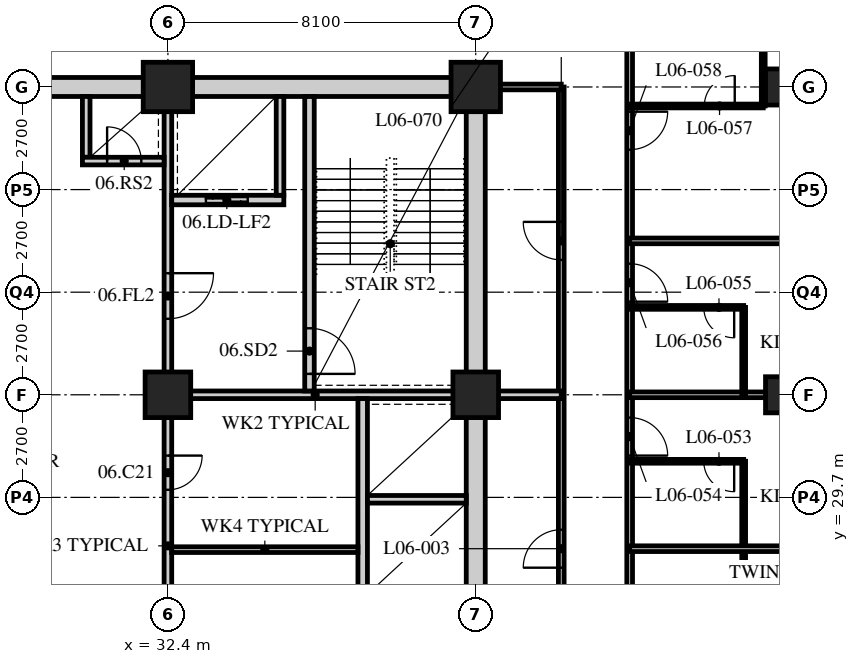
"""IFC4 building model, lengths in metres.
Left out: names, types, materials, properties, quantities, classifications, styles, units other than length and angle.
Written with IfcOpenShell. Run it as: python <this file> out.ifc"""

import sys

from ifc_helpers import new_model, si_unit, direction, frame, frame_2d, origin, origin_2d, place, context, subcontext, project, spatial, rectangle, hollow_rectangle, extrude, element, fill, save


model = new_model("IFC4")
c1 = context("Model", 3, precision=1e-05, world=origin(), true_north=direction((0.0, 1.0)))
c2 = subcontext(c1, "Body", "Model", "MODEL_VIEW")
j1 = project(units=[si_unit("LENGTHUNIT", "METRE"), si_unit("PLANEANGLEUNIT", "RADIAN")], contexts=[c1])
p1 = place(None, origin())
s1 = spatial("IfcSite", under=j1, at=p1, CompositionType="ELEMENT")
p2 = place(p1, origin())
s2 = spatial("IfcBuilding", under=s1, at=p2, CompositionType="ELEMENT")
p3 = place(p2, frame((0.0, 0.0, 33.0)))
s3 = spatial("IfcBuildingStorey", under=s2, at=p3, CompositionType="ELEMENT", Elevation=33.0)
p4 = place(p3, frame((32.4, 32.4, 0.0), z_axis=(0.0, 0.0, 1.0), x_axis=(1.0, 0.0, 0.0)))
e1 = element("IfcColumn", 1, at=p4, inside=s3, PredefinedType="COLUMN", context=c2, shape_type="SweptSolid", body=[
    extrude(hollow_rectangle(XDim=1.2, YDim=1.2, WallThickness=0.12, at=origin_2d()), origin(), (0.0, 0.0, 1.0), 3.4),
])
p5 = place(p3, frame((32.4, 40.5, 0.0), z_axis=(0.0, 0.0, 1.0), x_axis=(1.0, 0.0, 0.0)))
e2 = element("IfcColumn", 2, at=p5, inside=s3, PredefinedType="COLUMN", context=c2, shape_type="SweptSolid", body=[
    extrude(hollow_rectangle(XDim=1.3, YDim=1.3, WallThickness=0.13, at=origin_2d()), origin(), (0.0, 0.0, 1.0), 3.4),
])
p6 = place(p3, frame((40.5, 32.4, 0.0), z_axis=(0.0, 0.0, 1.0), x_axis=(1.0, 0.0, 0.0)))
e3 = element("IfcColumn", 3, at=p6, inside=s3, PredefinedType="COLUMN", context=c2, shape_type="SweptSolid", body=[
    extrude(hollow_rectangle(XDim=1.2, YDim=1.2, WallThickness=0.12, at=origin_2d()), origin(), (0.0, 0.0, 1.0), 3.4),
])
p7 = place(p3, frame((40.5, 40.5, 0.0), z_axis=(0.0, 0.0, 1.0), x_axis=(1.0, 0.0, 0.0)))
e4 = element("IfcColumn", 4, at=p7, inside=s3, PredefinedType="COLUMN", context=c2, shape_type="SweptSolid", body=[
    extrude(hollow_rectangle(XDim=1.3, YDim=1.3, WallThickness=0.13, at=origin_2d()), origin(), (0.0, 0.0, 1.0), 3.4),
])
for number, where, z_axis, x_axis in (
    (5, (48.6, 32.4, 0.0), (0.0, 0.0, 1.0), (1.0, 0.0, 0.0)),
    (6, (48.6, 40.5, 0.0), (0.0, 0.0, 1.0), (1.0, 0.0, 0.0)),
):
    element("IfcColumn", number, at=place(p3, frame(where, z_axis=z_axis, x_axis=x_axis)), inside=s3, PredefinedType="COLUMN", context=c2, shape_type="SweptSolid", body=[
        extrude(hollow_rectangle(XDim=0.95, YDim=0.95, WallThickness=0.095, at=origin_2d()), origin(), (0.0, 0.0, 1.0), 3.4),
    ])
p8 = place(p3, frame((44.55, 16.2, 0.0), z_axis=(0.0, 0.0, 1.0), x_axis=(0.0, 1.0, 0.0)))
e7 = element("IfcWall", 7, at=p8, inside=s3, PredefinedType="PARTITIONING", context=c2, shape_type="SweptSolid", body=[
    extrude(rectangle(XDim=26.1, YDim=0.15, at=frame_2d((13.05, 0.0))), origin(), (0.0, 0.0, 1.0), 3.19),
])
p9 = place(p8, frame((2.75, 0.0, 0.0)))
e8 = element("IfcOpeningElement", 8, at=p9, cuts=e7, PredefinedType="OPENING", context=c2, shape_type="SweptSolid", body=[
    extrude(rectangle(XDim=1.0, YDim=2.1, at=frame_2d((0.5, 1.05))), frame((0.0, 0.085, 0.0), z_axis=(0.0, -1.0, 0.0), x_axis=(1.0, 0.0, 0.0)), (0.0, 0.0, 1.0), 0.17),
])
p10 = place(p8, frame((4.35, 0.0, 0.0)))
e9 = element("IfcOpeningElement", 9, at=p10, cuts=e7, PredefinedType="OPENING", context=c2, shape_type="SweptSolid", body=[
    extrude(rectangle(XDim=1.0, YDim=2.1, at=frame_2d((0.5, 1.05))), frame((0.0, 0.085, 0.0), z_axis=(0.0, -1.0, 0.0), x_axis=(1.0, 0.0, 0.0)), (0.0, 0.0, 1.0), 0.17),
])
p11 = place(p8, frame((8.4, 0.0, 0.0)))
e10 = element("IfcOpeningElement", 10, at=p11, cuts=e7, PredefinedType="OPENING", context=c2, shape_type="SweptSolid", body=[
    extrude(rectangle(XDim=1.0, YDim=2.1, at=frame_2d((0.5, 1.05))), frame((0.0, 0.085, 0.0), z_axis=(0.0, -1.0, 0.0), x_axis=(1.0, 0.0, 0.0)), (0.0, 0.0, 1.0), 0.17),
])
p12 = place(p8, frame((14.6, 0.0, 0.0)))
e11 = element("IfcOpeningElement", 11, at=p12, cuts=e7, PredefinedType="OPENING", context=c2, shape_type="SweptSolid", body=[
    extrude(rectangle(XDim=1.0, YDim=2.1, at=frame_2d((0.5, 1.05))), frame((0.0, 0.085, 0.0), z_axis=(0.0, -1.0, 0.0), x_axis=(1.0, 0.0, 0.0)), (0.0, 0.0, 1.0), 0.17),
])
p13 = place(p8, frame((18.65, 0.0, 0.0)))
e12 = element("IfcOpeningElement", 12, at=p13, cuts=e7, PredefinedType="OPENING", context=c2, shape_type="SweptSolid", body=[
    extrude(rectangle(XDim=1.0, YDim=2.1, at=frame_2d((0.5, 1.05))), frame((0.0, 0.085, 0.0), z_axis=(0.0, -1.0, 0.0), x_axis=(1.0, 0.0, 0.0)), (0.0, 0.0, 1.0), 0.17),
])
p14 = place(p8, frame((22.65, 0.0, 0.0)))
e13 = element("IfcOpeningElement", 13, at=p14, cuts=e7, PredefinedType="OPENING", context=c2, shape_type="SweptSolid", body=[
    extrude(rectangle(XDim=1.0, YDim=2.1, at=frame_2d((0.5, 1.05))), frame((0.0, 0.085, 0.0), z_axis=(0.0, -1.0, 0.0), x_axis=(1.0, 0.0, 0.0)), (0.0, 0.0, 1.0), 0.17),
])
p15 = place(p3, frame((42.75, 18.0, 0.0), z_axis=(0.0, 0.0, 1.0), x_axis=(0.0, 1.0, 0.0)))
e14 = element("IfcWall", 14, at=p15, inside=s3, PredefinedType="PARTITIONING", context=c2, shape_type="SweptSolid", body=[
    extrude(rectangle(XDim=22.5, YDim=0.15, at=frame_2d((11.25, 0.0))), origin(), (0.0, 0.0, 1.0), 3.19),
])
p16 = place(p15, frame((9.85, 0.0, 0.0)))
e15 = element("IfcOpeningElement", 15, at=p16, cuts=e14, PredefinedType="OPENING", context=c2, shape_type="SweptSolid", body=[
    extrude(rectangle(XDim=1.0, YDim=2.1, at=frame_2d((0.5, 1.05))), frame((0.0, 0.085, 0.0), z_axis=(0.0, -1.0, 0.0), x_axis=(1.0, 0.0, 0.0)), (0.0, 0.0, 1.0), 0.17),
])
p17 = place(p15, frame((17.95, 0.0, 0.0)))
e16 = element("IfcOpeningElement", 16, at=p17, cuts=e14, PredefinedType="OPENING", context=c2, shape_type="SweptSolid", body=[
    extrude(rectangle(XDim=1.0, YDim=2.1, at=frame_2d((0.5, 1.05))), frame((0.0, 0.085, 0.0), z_axis=(0.0, -1.0, 0.0), x_axis=(1.0, 0.0, 0.0)), (0.0, 0.0, 1.0), 0.17),
])
p18 = place(p3, frame((42.75, 40.5, 0.0), z_axis=(0.0, 0.0, 1.0), x_axis=(-1.0, 0.0, 0.0)))
e17 = element("IfcWall", 17, at=p18, inside=s3, PredefinedType="PARTITIONING", context=c2, shape_type="SweptSolid", body=[
    extrude(rectangle(XDim=2.05, YDim=0.15, at=frame_2d((1.025, 0.0))), origin(), (0.0, 0.0, 1.0), 2.578),
])
p19 = place(p3, frame((40.5, 32.4, 0.0), z_axis=(0.0, 0.0, 1.0), x_axis=(1.0, 0.0, 0.0)))
e18 = element("IfcWall", 18, at=p19, inside=s3, PredefinedType="SOLIDWALL", context=c2, shape_type="SweptSolid", body=[
    extrude(rectangle(XDim=2.25, YDim=0.2, at=frame_2d((1.125, 0.0))), origin(), (0.0, 0.0, 1.0), 2.578),
])
p20 = place(p3, frame((47.55, 25.75, 0.0), z_axis=(0.0, 0.0, 1.0), x_axis=(0.0, 1.0, 0.0)))
e19 = element("IfcWall", 19, at=p20, inside=s3, PredefinedType="PARTITIONING", context=c2, shape_type="SweptSolid", body=[
    extrude(rectangle(XDim=4.9, YDim=0.1, at=frame_2d((2.45, 0.0))), origin(), (0.0, 0.0, 1.0), 3.19),
])
p21 = place(p3, frame((44.55, 28.35, 0.0), z_axis=(0.0, 0.0, 1.0), x_axis=(1.0, 0.0, 0.0)))
e20 = element("IfcWall", 20, at=p21, inside=s3, PredefinedType="PARTITIONING", context=c2, shape_type="SweptSolid", body=[
    extrude(rectangle(XDim=11.85, YDim=0.15, at=frame_2d((5.925, 0.0))), origin(), (0.0, 0.0, 1.0), 3.19),
])
p22 = place(p3, frame((44.55, 30.65, 0.0), z_axis=(0.0, 0.0, 1.0), x_axis=(1.0, 0.0, 0.0)))
e21 = element("IfcWall", 21, at=p22, inside=s3, PredefinedType="PARTITIONING", context=c2, shape_type="SweptSolid", body=[
    extrude(rectangle(XDim=3.0, YDim=0.1, at=frame_2d((1.5, 0.0))), origin(), (0.0, 0.0, 1.0), 3.19),
])
p23 = place(p22, frame((1.95, 0.0, 0.0)))
e22 = element("IfcOpeningElement", 22, at=p23, cuts=e21, PredefinedType="OPENING", context=c2, shape_type="SweptSolid", body=[
    extrude(rectangle(XDim=0.8, YDim=2.1, at=frame_2d((0.4, 1.05))), frame((0.0, 0.06, 0.0), z_axis=(0.0, -1.0, 0.0), x_axis=(1.0, 0.0, 0.0)), (0.0, 0.0, 1.0), 0.12),
])
p24 = place(p3, frame((44.55, 32.4, 0.0), z_axis=(0.0, 0.0, 1.0), x_axis=(1.0, 0.0, 0.0)))
e23 = element("IfcWall", 23, at=p24, inside=s3, PredefinedType="PARTITIONING", context=c2, shape_type="SweptSolid", body=[
    extrude(rectangle(XDim=11.85, YDim=0.15, at=frame_2d((5.925, 0.0))), origin(), (0.0, 0.0, 1.0), 2.578),
])
p25 = place(p3, frame((47.55, 32.4, 0.0), z_axis=(0.0, 0.0, 1.0), x_axis=(0.0, 1.0, 0.0)))
e24 = element("IfcWall", 24, at=p25, inside=s3, PredefinedType="PARTITIONING", context=c2, shape_type="SweptSolid", body=[
    extrude(rectangle(XDim=2.3, YDim=0.1, at=frame_2d((1.15, 0.0))), origin(), (0.0, 0.0, 1.0), 3.19),
])
p26 = place(p3, frame((44.55, 34.7, 0.0), z_axis=(0.0, 0.0, 1.0), x_axis=(1.0, 0.0, 0.0)))
e25 = element("IfcWall", 25, at=p26, inside=s3, PredefinedType="PARTITIONING", context=c2, shape_type="SweptSolid", body=[
    extrude(rectangle(XDim=3.0, YDim=0.1, at=frame_2d((1.5, 0.0))), origin(), (0.0, 0.0, 1.0), 3.19),
])
p27 = place(p26, frame((1.95, 0.0, 0.0)))
e26 = element("IfcOpeningElement", 26, at=p27, cuts=e25, PredefinedType="OPENING", context=c2, shape_type="SweptSolid", body=[
    extrude(rectangle(XDim=0.8, YDim=2.1, at=frame_2d((0.4, 1.05))), frame((0.0, 0.06, 0.0), z_axis=(0.0, -1.0, 0.0), x_axis=(1.0, 0.0, 0.0)), (0.0, 0.0, 1.0), 0.12),
])
p28 = place(p3, frame((44.55, 36.45, 0.0), z_axis=(0.0, 0.0, 1.0), x_axis=(1.0, 0.0, 0.0)))
e27 = element("IfcWall", 27, at=p28, inside=s3, PredefinedType="PARTITIONING", context=c2, shape_type="SweptSolid", body=[
    extrude(rectangle(XDim=11.85, YDim=0.15, at=frame_2d((5.925, 0.0))), origin(), (0.0, 0.0, 1.0), 3.19),
])
p29 = place(p3, frame((48.065, 40.0, 0.0), z_axis=(0.0, 0.0, 1.0), x_axis=(0.0, 1.0, 0.0)))
e28 = element("IfcWall", 28, at=p29, inside=s3, PredefinedType="PARTITIONING", context=c2, shape_type="SweptSolid", body=[
    extrude(rectangle(XDim=2.3, YDim=0.1, at=frame_2d((1.15, 0.0))), origin(), (0.0, 0.0, 1.0), 3.19),
])
p30 = place(p3, frame((44.55, 40.0, 0.0), z_axis=(0.0, 0.0, 1.0), x_axis=(1.0, 0.0, 0.0)))
e29 = element("IfcWall", 29, at=p30, inside=s3, PredefinedType="PARTITIONING", context=c2, shape_type="SweptSolid", body=[
    extrude(rectangle(XDim=3.515, YDim=0.1, at=frame_2d((1.757, 0.0))), origin(), (0.0, 0.0, 1.0), 3.19),
])
p31 = place(p30, frame((1.965, 0.0, 0.0)))
e30 = element("IfcOpeningElement", 30, at=p31, cuts=e29, PredefinedType="OPENING", context=c2, shape_type="SweptSolid", body=[
    extrude(rectangle(XDim=0.8, YDim=2.1, at=frame_2d((0.4, 1.05))), frame((0.0, 0.06, 0.0), z_axis=(0.0, -1.0, 0.0), x_axis=(1.0, 0.0, 0.0)), (0.0, 0.0, 1.0), 0.12),
])
p32 = place(p3, frame((15.95, 40.5, 0.0), z_axis=(0.0, 0.0, 1.0), x_axis=(1.0, 0.0, 0.0)))
e31 = element("IfcWall", 31, at=p32, inside=s3, PredefinedType="SOLIDWALL", context=c2, shape_type="SweptSolid", body=[
    extrude(rectangle(XDim=24.8, YDim=0.5, at=frame_2d((12.4, 0.0))), origin(), (0.0, 0.0, 1.0), 2.54),
])
p33 = place(p32, frame((11.5, 0.0, 0.0)))
e32 = element("IfcOpeningElement", 32, at=p33, cuts=e31, PredefinedType="OPENING", context=c2, shape_type="SweptSolid", body=[
    extrude(rectangle(XDim=1.8, YDim=2.4, at=frame_2d((0.9, 1.2))), frame((0.0, 0.26, 0.0), z_axis=(0.0, -1.0, 0.0), x_axis=(1.0, 0.0, 0.0)), (0.0, 0.0, 1.0), 0.52),
])
p34 = place(p3, frame((40.5, 24.55, 0.0), z_axis=(0.0, 0.0, 1.0), x_axis=(0.0, 1.0, 0.0)))
e33 = element("IfcWall", 33, at=p34, inside=s3, PredefinedType="SOLIDWALL", context=c2, shape_type="SweptSolid", body=[
    extrude(rectangle(XDim=15.7, YDim=0.5, at=frame_2d((7.85, 0.0))), origin(), (0.0, 0.0, 1.0), 2.578),
])
p35 = place(p3, frame((32.3, 32.4, 0.0), z_axis=(0.0, 0.0, 1.0), x_axis=(1.0, 0.0, 0.0)))
e34 = element("IfcWall", 34, at=p35, inside=s3, PredefinedType="SOLIDWALL", context=c2, shape_type="SweptSolid", body=[
    extrude(rectangle(XDim=7.95, YDim=0.2, at=frame_2d((3.975, 0.0))), origin(), (0.0, 0.0, 1.0), 2.578),
])
p36 = place(p3, frame((32.4, 32.5, 0.0), z_axis=(0.0, 0.0, 1.0), x_axis=(0.0, 1.0, 0.0)))
e35 = element("IfcWall", 35, at=p36, inside=s3, PredefinedType="SOLIDWALL", context=c2, shape_type="SweptSolid", body=[
    extrude(rectangle(XDim=7.75, YDim=0.2, at=frame_2d((3.875, 0.0))), origin(), (0.0, 0.0, 1.0), 2.578),
])
p37 = place(p36, frame((1.9, 0.0, 0.0)))
e36 = element("IfcOpeningElement", 36, at=p37, cuts=e35, PredefinedType="OPENING", context=c2, shape_type="SweptSolid", body=[
    extrude(rectangle(XDim=1.2, YDim=2.1, at=frame_2d((0.6, 1.05))), frame((0.0, 0.11, 0.0), z_axis=(0.0, -1.0, 0.0), x_axis=(1.0, 0.0, 0.0)), (0.0, 0.0, 1.0), 0.22),
])
p38 = place(p3, frame((37.525, 24.55, 0.0), z_axis=(0.0, 0.0, 1.0), x_axis=(0.0, 1.0, 0.0)))
e37 = element("IfcWall", 37, at=p38, inside=s3, PredefinedType="SOLIDWALL", context=c2, shape_type="SweptSolid", body=[
    extrude(rectangle(XDim=7.75, YDim=0.25, at=frame_2d((3.875, 0.0))), origin(), (0.0, 0.0, 1.0), 3.19),
])
p39 = place(p3, frame((37.65, 29.65, 0.0), z_axis=(0.0, 0.0, 1.0), x_axis=(1.0, 0.0, 0.0)))
e38 = element("IfcWall", 38, at=p39, inside=s3, PredefinedType="SOLIDWALL", context=c2, shape_type="SweptSolid", body=[
    extrude(rectangle(XDim=2.6, YDim=0.2, at=frame_2d((1.3, 0.0))), origin(), (0.0, 0.0, 1.0), 3.19),
])
p40 = place(p3, frame((36.125, 32.5, 0.0), z_axis=(0.0, 0.0, 1.0), x_axis=(0.0, 1.0, 0.0)))
e39 = element("IfcWall", 39, at=p40, inside=s3, PredefinedType="SOLIDWALL", context=c2, shape_type="SweptSolid", body=[
    extrude(rectangle(XDim=7.75, YDim=0.25, at=frame_2d((3.875, 0.0))), origin(), (0.0, 0.0, 1.0), 3.19),
])
p41 = place(p40, frame((0.45, 0.0, 0.0)))
e40 = element("IfcOpeningElement", 40, at=p41, cuts=e39, PredefinedType="OPENING", context=c2, shape_type="SweptSolid", body=[
    extrude(rectangle(XDim=1.2, YDim=2.1, at=frame_2d((0.6, 1.05))), frame((0.0, 0.135, 0.0), z_axis=(0.0, -1.0, 0.0), x_axis=(1.0, 0.0, 0.0)), (0.0, 0.0, 1.0), 0.27),
])
p42 = place(p3, frame((32.5, 37.525, 0.0), z_axis=(0.0, 0.0, 1.0), x_axis=(1.0, 0.0, 0.0)))
e41 = element("IfcWall", 41, at=p42, inside=s3, PredefinedType="SOLIDWALL", context=c2, shape_type="SweptSolid", body=[
    extrude(rectangle(XDim=2.95, YDim=0.25, at=frame_2d((1.475, 0.0))), origin(), (0.0, 0.0, 1.0), 3.19),
])
p43 = place(p42, frame((0.9, 0.0, 0.0)))
e42 = element("IfcOpeningElement", 42, at=p43, cuts=e41, PredefinedType="OPENING", context=c2, shape_type="SweptSolid", body=[
    extrude(rectangle(XDim=1.1, YDim=2.4, at=frame_2d((0.55, 1.2))), frame((0.0, 0.135, 0.0), z_axis=(0.0, -1.0, 0.0), x_axis=(1.0, 0.0, 0.0)), (0.0, 0.0, 1.0), 0.27),
])
p44 = place(p3, frame((35.35, 37.65, 0.0), z_axis=(0.0, 0.0, 1.0), x_axis=(0.0, 1.0, 0.0)))
e43 = element("IfcWall", 43, at=p44, inside=s3, PredefinedType="SOLIDWALL", context=c2, shape_type="SweptSolid", body=[
    extrude(rectangle(XDim=2.6, YDim=0.2, at=frame_2d((1.3, 0.0))), origin(), (0.0, 0.0, 1.0), 3.19),
])
p45 = place(p3, frame((30.25, 38.65, 0.0), z_axis=(0.0, 0.0, 1.0), x_axis=(0.0, 1.0, 0.0)))
e44 = element("IfcWall", 44, at=p45, inside=s3, PredefinedType="SOLIDWALL", context=c2, shape_type="SweptSolid", body=[
    extrude(rectangle(XDim=1.6, YDim=0.2, at=frame_2d((0.8, 0.0))), origin(), (0.0, 0.0, 1.0), 3.19),
])
p46 = place(p3, frame((30.15, 38.55, 0.0), z_axis=(0.0, 0.0, 1.0), x_axis=(1.0, 0.0, 0.0)))
e45 = element("IfcWall", 45, at=p46, inside=s3, PredefinedType="SOLIDWALL", context=c2, shape_type="SweptSolid", body=[
    extrude(rectangle(XDim=2.15, YDim=0.2, at=frame_2d((1.075, 0.0))), origin(), (0.0, 0.0, 1.0), 3.19),
])
p47 = place(p46, frame((0.65, 0.0, 0.0)))
e46 = element("IfcOpeningElement", 46, at=p47, cuts=e45, PredefinedType="OPENING", context=c2, shape_type="SweptSolid", body=[
    extrude(rectangle(XDim=0.9, YDim=2.1, at=frame_2d((0.45, 1.05))), frame((0.0, 0.11, 0.0), z_axis=(0.0, -1.0, 0.0), x_axis=(1.0, 0.0, 0.0)), (0.0, 0.0, 1.0), 0.22),
])
p48 = place(p3, frame((32.4, 24.55, 0.0), z_axis=(0.0, 0.0, 1.0), x_axis=(0.0, 1.0, 0.0)))
e47 = element("IfcWall", 47, at=p48, inside=s3, PredefinedType="PARTITIONING", context=c2, shape_type="SweptSolid", body=[
    extrude(rectangle(XDim=7.75, YDim=0.2, at=frame_2d((3.875, 0.0))), origin(), (0.0, 0.0, 1.0), 2.578),
])
p49 = place(p48, frame((1.4, 0.0, 0.0)))
e48 = element("IfcOpeningElement", 48, at=p49, cuts=e47, PredefinedType="OPENING", context=c2, shape_type="SweptSolid", body=[
    extrude(rectangle(XDim=0.9, YDim=2.1, at=frame_2d((0.45, 1.05))), frame((0.0, 0.11, 0.0), z_axis=(0.0, -1.0, 0.0), x_axis=(1.0, 0.0, 0.0)), (0.0, 0.0, 1.0), 0.22),
])
p50 = place(p48, frame((5.35, 0.0, 0.0)))
e49 = element("IfcOpeningElement", 49, at=p50, cuts=e47, PredefinedType="OPENING", context=c2, shape_type="SweptSolid", body=[
    extrude(rectangle(XDim=0.9, YDim=2.1, at=frame_2d((0.45, 1.05))), frame((0.0, 0.11, 0.0), z_axis=(0.0, -1.0, 0.0), x_axis=(1.0, 0.0, 0.0)), (0.0, 0.0, 1.0), 0.22),
])
p51 = place(p3, frame((32.5, 28.325, 0.0), z_axis=(0.0, 0.0, 1.0), x_axis=(1.0, 0.0, 0.0)))
e50 = element("IfcWall", 50, at=p51, inside=s3, PredefinedType="PARTITIONING", context=c2, shape_type="SweptSolid", body=[
    extrude(rectangle(XDim=4.9, YDim=0.15, at=frame_2d((2.45, 0.0))), origin(), (0.0, 0.0, 1.0), 3.19),
])
p52 = place(p16, origin())
e51 = element("IfcDoor", 51, at=p52, inside=s3, OperationType="SINGLE_SWING_LEFT", PredefinedType="DOOR", context=c2, shape_type="SweptSolid", body=[
    extrude(rectangle(XDim=1.0, YDim=2.1, at=frame_2d((0.5, 1.05))), frame((0.0, 0.025, 0.0), z_axis=(0.0, -1.0, 0.0), x_axis=(1.0, 0.0, 0.0)), (0.0, 0.0, 1.0), 0.05),
])
fill(e15, e51)
p53 = place(p17, origin())
e52 = element("IfcDoor", 52, at=p53, inside=s3, OperationType="SINGLE_SWING_RIGHT", PredefinedType="DOOR", context=c2, shape_type="SweptSolid", body=[
    extrude(rectangle(XDim=1.0, YDim=2.1, at=frame_2d((0.5, 1.05))), frame((0.0, 0.025, 0.0), z_axis=(0.0, -1.0, 0.0), x_axis=(1.0, 0.0, 0.0)), (0.0, 0.0, 1.0), 0.05),
])
fill(e16, e52)
p54 = place(p23, origin())
e53 = element("IfcDoor", 53, at=p54, inside=s3, OperationType="SINGLE_SWING_LEFT", PredefinedType="DOOR", context=c2, shape_type="SweptSolid", body=[
    extrude(rectangle(XDim=0.8, YDim=2.1, at=frame_2d((0.4, 1.05))), frame((0.0, 0.025, 0.0), z_axis=(0.0, -1.0, 0.0), x_axis=(1.0, 0.0, 0.0)), (0.0, 0.0, 1.0), 0.05),
])
fill(e22, e53)
p55 = place(p12, origin())
e54 = element("IfcDoor", 54, at=p55, inside=s3, OperationType="SINGLE_SWING_RIGHT", PredefinedType="DOOR", context=c2, shape_type="SweptSolid", body=[
    extrude(rectangle(XDim=1.0, YDim=2.1, at=frame_2d((0.5, 1.05))), frame((0.0, 0.025, 0.0), z_axis=(0.0, -1.0, 0.0), x_axis=(1.0, 0.0, 0.0)), (0.0, 0.0, 1.0), 0.05),
])
fill(e11, e54)
p56 = place(p27, origin())
e55 = element("IfcDoor", 55, at=p56, inside=s3, OperationType="SINGLE_SWING_LEFT", PredefinedType="DOOR", context=c2, shape_type="SweptSolid", body=[
    extrude(rectangle(XDim=0.8, YDim=2.1, at=frame_2d((0.4, 1.05))), frame((0.0, 0.025, 0.0), z_axis=(0.0, -1.0, 0.0), x_axis=(1.0, 0.0, 0.0)), (0.0, 0.0, 1.0), 0.05),
])
fill(e26, e55)
p57 = place(p13, origin())
e56 = element("IfcDoor", 56, at=p57, inside=s3, OperationType="SINGLE_SWING_RIGHT", PredefinedType="DOOR", context=c2, shape_type="SweptSolid", body=[
    extrude(rectangle(XDim=1.0, YDim=2.1, at=frame_2d((0.5, 1.05))), frame((0.0, 0.025, 0.0), z_axis=(0.0, -1.0, 0.0), x_axis=(1.0, 0.0, 0.0)), (0.0, 0.0, 1.0), 0.05),
])
fill(e12, e56)
p58 = place(p31, origin())
e57 = element("IfcDoor", 57, at=p58, inside=s3, OperationType="SINGLE_SWING_RIGHT", PredefinedType="DOOR", context=c2, shape_type="SweptSolid", body=[
    extrude(rectangle(XDim=0.8, YDim=2.1, at=frame_2d((0.4, 1.05))), frame((0.0, 0.025, 0.0), z_axis=(0.0, -1.0, 0.0), x_axis=(1.0, 0.0, 0.0)), (0.0, 0.0, 1.0), 0.05),
])
fill(e30, e57)
p59 = place(p14, origin())
e58 = element("IfcDoor", 58, at=p59, inside=s3, OperationType="SINGLE_SWING_LEFT", PredefinedType="DOOR", context=c2, shape_type="SweptSolid", body=[
    extrude(rectangle(XDim=1.0, YDim=2.1, at=frame_2d((0.5, 1.05))), frame((0.0, 0.025, 0.0), z_axis=(0.0, -1.0, 0.0), x_axis=(1.0, 0.0, 0.0)), (0.0, 0.0, 1.0), 0.05),
])
fill(e13, e58)
p60 = place(p50, origin())
e59 = element("IfcDoor", 59, at=p60, inside=s3, OperationType="SINGLE_SWING_LEFT", PredefinedType="DOOR", context=c2, shape_type="SweptSolid", body=[
    extrude(rectangle(XDim=0.9, YDim=2.1, at=frame_2d((0.45, 1.05))), frame((0.0, 0.025, 0.0), z_axis=(0.0, -1.0, 0.0), x_axis=(1.0, 0.0, 0.0)), (0.0, 0.0, 1.0), 0.05),
])
fill(e49, e59)
p61 = place(p41, origin())
e60 = element("IfcDoor", 60, at=p61, inside=s3, OperationType="SINGLE_SWING_RIGHT", PredefinedType="DOOR", context=c2, shape_type="SweptSolid", body=[
    extrude(rectangle(XDim=1.2, YDim=2.1, at=frame_2d((0.6, 1.05))), frame((0.0, 0.025, 0.0), z_axis=(0.0, -1.0, 0.0), x_axis=(1.0, 0.0, 0.0)), (0.0, 0.0, 1.0), 0.05),
])
fill(e40, e60)
p62 = place(p37, origin())
e61 = element("IfcDoor", 61, at=p62, inside=s3, OperationType="SINGLE_SWING_LEFT", PredefinedType="DOOR", context=c2, shape_type="SweptSolid", body=[
    extrude(rectangle(XDim=1.2, YDim=2.1, at=frame_2d((0.6, 1.05))), frame((0.0, 0.025, 0.0), z_axis=(0.0, -1.0, 0.0), x_axis=(1.0, 0.0, 0.0)), (0.0, 0.0, 1.0), 0.05),
])
fill(e36, e61)
p63 = place(p47, origin())
e62 = element("IfcDoor", 62, at=p63, inside=s3, OperationType="SINGLE_SWING_LEFT", PredefinedType="DOOR", context=c2, shape_type="SweptSolid", body=[
    extrude(rectangle(XDim=0.9, YDim=2.1, at=frame_2d((0.45, 1.05))), frame((0.0, 0.025, 0.0), z_axis=(0.0, -1.0, 0.0), x_axis=(1.0, 0.0, 0.0)), (0.0, 0.0, 1.0), 0.05),
])
fill(e46, e62)
p64 = place(p43, origin())
e63 = element("IfcDoor", 63, at=p64, inside=s3, OperationType="DOUBLE_DOOR_SLIDING", PredefinedType="DOOR", context=c2, shape_type="SweptSolid", body=[
    extrude(rectangle(XDim=1.1, YDim=2.4, at=frame_2d((0.55, 1.2))), frame((0.0, 0.025, 0.0), z_axis=(0.0, -1.0, 0.0), x_axis=(1.0, 0.0, 0.0)), (0.0, 0.0, 1.0), 0.05),
])
fill(e42, e63)
save(model, sys.argv[1])
